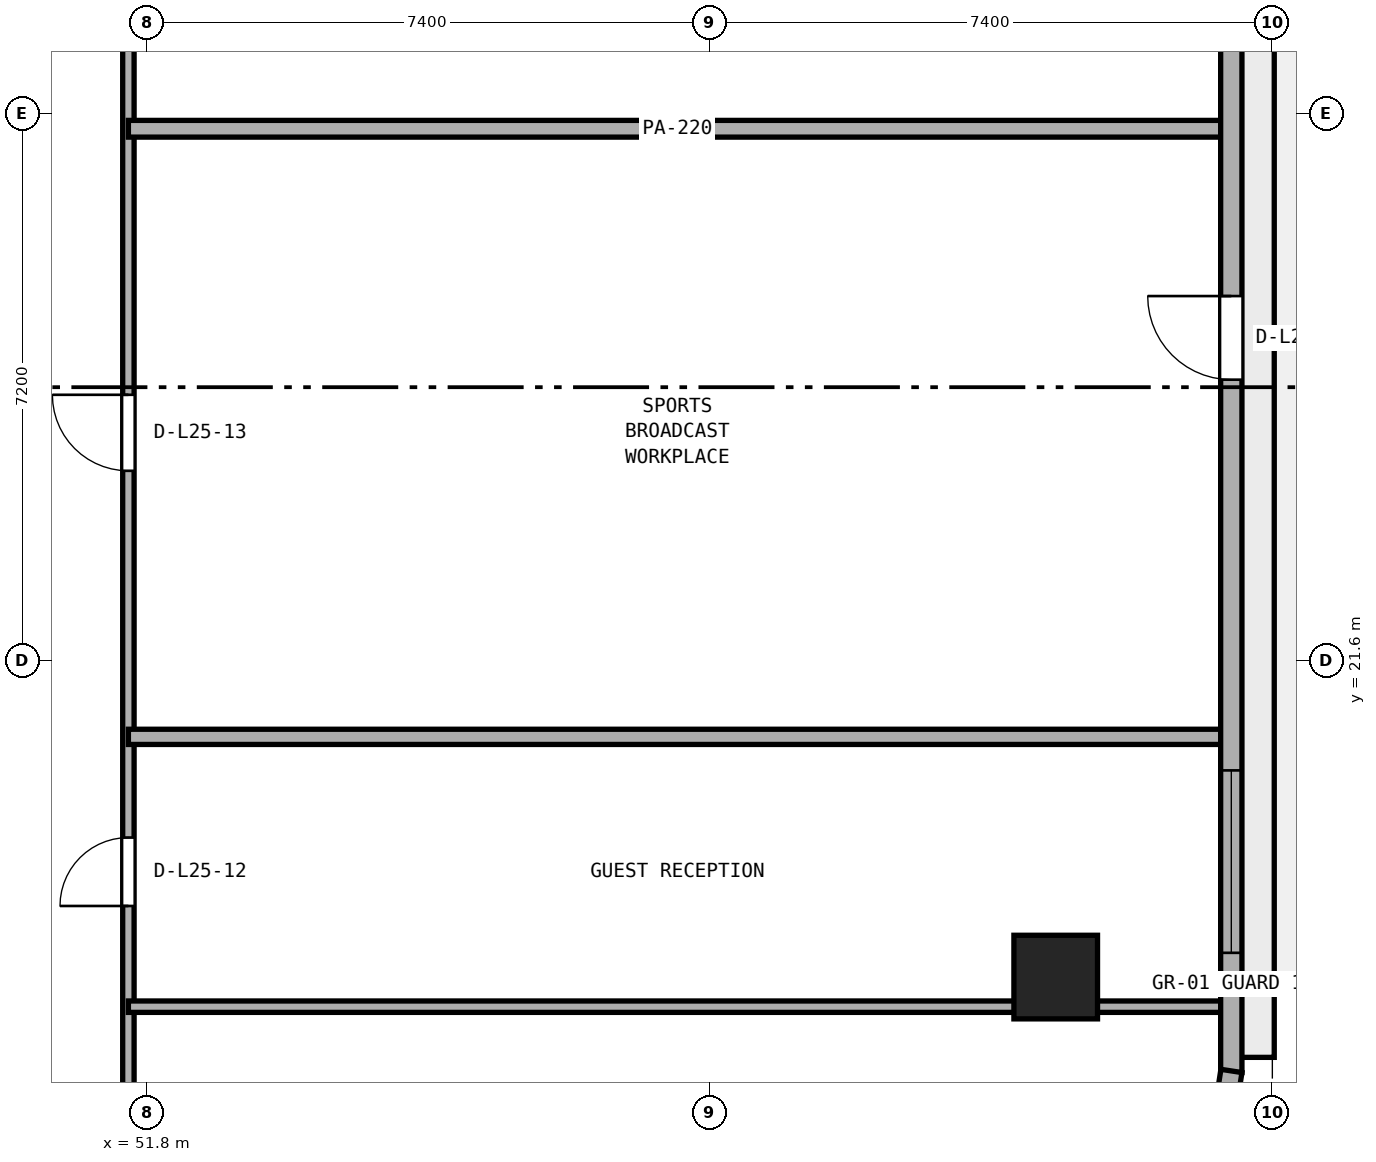
"""IFC4 building model, lengths in metres.
Left out: names, types, materials, properties, quantities, classifications, styles, units other than length and angle.
Written with IfcOpenShell. Run it as: python <this file> out.ifc"""

import sys

from ifc_helpers import new_model, si_unit, direction, frame, frame_2d, origin, origin_2d, place, context, subcontext, project, spatial, rectangle, extrude, element, fill, save


model = new_model("IFC4")
c1 = context("Model", 3, precision=1e-05, world=origin(), true_north=direction((0.0, 1.0)))
c2 = subcontext(c1, "Body", "Model", "MODEL_VIEW")
j1 = project(units=[si_unit("LENGTHUNIT", "METRE"), si_unit("PLANEANGLEUNIT", "RADIAN")], contexts=[c1])
p1 = place(None, origin())
s1 = spatial("IfcSite", under=j1, at=p1, CompositionType="ELEMENT")
p2 = place(p1, origin())
s2 = spatial("IfcBuilding", under=s1, at=p2, CompositionType="ELEMENT")
p3 = place(p2, frame((0.0, 0.0, 101.0)))
s3 = spatial("IfcBuildingStorey", under=s2, at=p3, CompositionType="ELEMENT", Elevation=101.0)
p4 = place(p3, frame((63.75, 17.44, 0.0), z_axis=(0.0, 0.0, 1.0), x_axis=(1.0, 0.0, 0.0)))
e1 = element("IfcColumn", 1, at=p4, inside=s3, PredefinedType="COLUMN", context=c2, shape_type="SweptSolid", body=[
    extrude(rectangle(XDim=1.1, YDim=1.1, at=origin_2d()), origin(), (0.0, 0.0, 1.0), 3.8),
])
p5 = place(p3, frame((51.55, 14.05, 0.0), z_axis=(0.0, 0.0, 1.0), x_axis=(0.0, 1.0, 0.0)))
e2 = element("IfcWall", 2, at=p5, inside=s3, PredefinedType="PARTITIONING", context=c2, shape_type="SweptSolid", body=[
    extrude(rectangle(XDim=22.3, YDim=0.15, at=frame_2d((11.15, 0.0))), origin(), (0.0, 0.0, 1.0), 3.525),
])
p6 = place(p5, frame((4.325, 0.0, 0.0)))
e3 = element("IfcOpeningElement", 3, at=p6, cuts=e2, PredefinedType="OPENING", context=c2, shape_type="SweptSolid", body=[
    extrude(rectangle(XDim=0.9, YDim=2.1, at=frame_2d((0.45, 1.05))), frame((0.0, 0.085, 0.0), z_axis=(0.0, -1.0, 0.0), x_axis=(1.0, 0.0, 0.0)), (0.0, 0.0, 1.0), 0.17),
])
p7 = place(p5, frame((10.05, 0.0, 0.0)))
e4 = element("IfcOpeningElement", 4, at=p7, cuts=e2, PredefinedType="OPENING", context=c2, shape_type="SweptSolid", body=[
    extrude(rectangle(XDim=1.0, YDim=2.12, at=frame_2d((0.5, 1.06))), frame((0.0, 0.085, 0.0), z_axis=(0.0, -1.0, 0.0), x_axis=(1.0, 0.0, 0.0)), (0.0, 0.0, 1.0), 0.17),
])
p8 = place(p5, frame((16.425, 0.0, 0.0)))
e5 = element("IfcOpeningElement", 5, at=p8, cuts=e2, PredefinedType="OPENING", context=c2, shape_type="SweptSolid", body=[
    extrude(rectangle(XDim=1.0, YDim=2.12, at=frame_2d((0.5, 1.06))), frame((0.0, 0.085, 0.0), z_axis=(0.0, -1.0, 0.0), x_axis=(1.0, 0.0, 0.0)), (0.0, 0.0, 1.0), 0.17),
])
p9 = place(p3, frame((51.55, 17.05, 0.0), z_axis=(0.0, 0.0, 1.0), x_axis=(1.0, 0.0, 0.0)))
e6 = element("IfcWall", 6, at=p9, inside=s3, PredefinedType="PARTITIONING", context=c2, shape_type="SweptSolid", body=[
    extrude(rectangle(XDim=14.445, YDim=0.15, at=frame_2d((7.223, 0.0))), origin(), (0.0, 0.0, 1.0), 3.525),
])
p10 = place(p3, frame((51.55, 20.6, 0.0), z_axis=(0.0, 0.0, 1.0), x_axis=(1.0, 0.0, 0.0)))
e7 = element("IfcWall", 7, at=p10, inside=s3, PredefinedType="PARTITIONING", context=c2, shape_type="SweptSolid", body=[
    extrude(rectangle(XDim=14.445, YDim=0.2, at=frame_2d((7.223, 0.0))), origin(), (0.0, 0.0, 1.0), 3.525),
])
p11 = place(p3, frame((51.55, 28.6, 0.0), z_axis=(0.0, 0.0, 1.0), x_axis=(1.0, 0.0, 0.0)))
e8 = element("IfcWall", 8, at=p11, inside=s3, PredefinedType="PARTITIONING", context=c2, shape_type="SweptSolid", body=[
    extrude(rectangle(XDim=14.445, YDim=0.22, at=frame_2d((7.223, 0.0))), origin(), (0.0, 0.0, 1.0), 3.525),
])
p12 = place(p3, frame((66.06, 16.183, 0.0), z_axis=(0.0, 0.0, 1.0), x_axis=(0.0, 1.0, 0.0)))
e9 = element("IfcWall", 9, at=p12, inside=s3, PredefinedType="STANDARD", context=c2, shape_type="SweptSolid", body=[
    extrude(rectangle(XDim=19.331, YDim=0.28, at=frame_2d((9.666, 0.0))), origin(), (0.0, 0.0, 1.0), 3.525),
])
p13 = place(p12, frame((9.115, 0.0, 0.0)))
e10 = element("IfcOpeningElement", 10, at=p13, cuts=e9, PredefinedType="OPENING", context=c2, shape_type="SweptSolid", body=[
    extrude(rectangle(XDim=1.1, YDim=2.2, at=frame_2d((0.55, 1.1))), frame((0.0, 0.15, 0.0), z_axis=(0.0, -1.0, 0.0), x_axis=(1.0, 0.0, 0.0)), (0.0, 0.0, 1.0), 0.3),
])
p14 = place(p12, frame((1.575, 0.0, 0.9)))
e11 = element("IfcOpeningElement", 11, at=p14, cuts=e9, PredefinedType="OPENING", context=c2, shape_type="SweptSolid", body=[
    extrude(rectangle(XDim=2.4, YDim=1.75, at=frame_2d((1.2, 0.875))), frame((0.0, 0.15, 0.0), z_axis=(0.0, -1.0, 0.0), x_axis=(1.0, 0.0, 0.0)), (0.0, 0.0, 1.0), 0.3),
])
p15 = place(p12, frame((14.326, 0.0, 0.9)))
e12 = element("IfcOpeningElement", 12, at=p15, cuts=e9, PredefinedType="OPENING", context=c2, shape_type="SweptSolid", body=[
    extrude(rectangle(XDim=2.4, YDim=1.75, at=frame_2d((1.2, 0.875))), frame((0.0, 0.15, 0.0), z_axis=(0.0, -1.0, 0.0), x_axis=(1.0, 0.0, 0.0)), (0.0, 0.0, 1.0), 0.3),
])
p16 = place(p3, frame((65.867, 14.943, 0.0), z_axis=(0.0, 0.0, 1.0), x_axis=(0.152014078361, 0.988378328364, 0.0)))
e13 = element("IfcWall", 13, at=p16, inside=s3, PredefinedType="STANDARD", context=c2, shape_type="SweptSolid", body=[
    extrude(rectangle(XDim=1.277, YDim=0.28, at=frame_2d((0.638, 0.0))), origin(), (0.0, 0.0, 1.0), 3.525),
])
p17 = place(p6, origin())
e14 = element("IfcDoor", 14, at=p17, inside=s3, OperationType="SINGLE_SWING_LEFT", PredefinedType="DOOR", context=c2, shape_type="SweptSolid", body=[
    extrude(rectangle(XDim=0.9, YDim=2.1, at=frame_2d((0.45, 1.05))), frame((0.0, 0.025, 0.0), z_axis=(0.0, -1.0, 0.0), x_axis=(1.0, 0.0, 0.0)), (0.0, 0.0, 1.0), 0.05),
])
fill(e3, e14)
p18 = place(p7, origin())
e15 = element("IfcDoor", 15, at=p18, inside=s3, OperationType="SINGLE_SWING_RIGHT", PredefinedType="DOOR", context=c2, shape_type="SweptSolid", body=[
    extrude(rectangle(XDim=1.0, YDim=2.12, at=frame_2d((0.5, 1.06))), frame((0.0, 0.025, 0.0), z_axis=(0.0, -1.0, 0.0), x_axis=(1.0, 0.0, 0.0)), (0.0, 0.0, 1.0), 0.05),
])
fill(e4, e15)
p19 = place(p13, origin())
e16 = element("IfcDoor", 16, at=p19, inside=s3, OperationType="SINGLE_SWING_RIGHT", PredefinedType="DOOR", context=c2, shape_type="SweptSolid", body=[
    extrude(rectangle(XDim=1.1, YDim=2.2, at=frame_2d((0.55, 1.1))), frame((0.0, 0.025, 0.0), z_axis=(0.0, -1.0, 0.0), x_axis=(1.0, 0.0, 0.0)), (0.0, 0.0, 1.0), 0.05),
])
fill(e10, e16)
p20 = place(p14, origin())
e17 = element("IfcWindow", 17, at=p20, inside=s3, PartitioningType="SINGLE_PANEL", PredefinedType="WINDOW", context=c2, shape_type="SweptSolid", body=[
    extrude(rectangle(XDim=2.4, YDim=1.75, at=frame_2d((1.2, 0.875))), frame((0.0, 0.03, 0.0), z_axis=(0.0, -1.0, 0.0), x_axis=(1.0, 0.0, 0.0)), (0.0, 0.0, 1.0), 0.06),
])
fill(e11, e17)
save(model, sys.argv[1])
